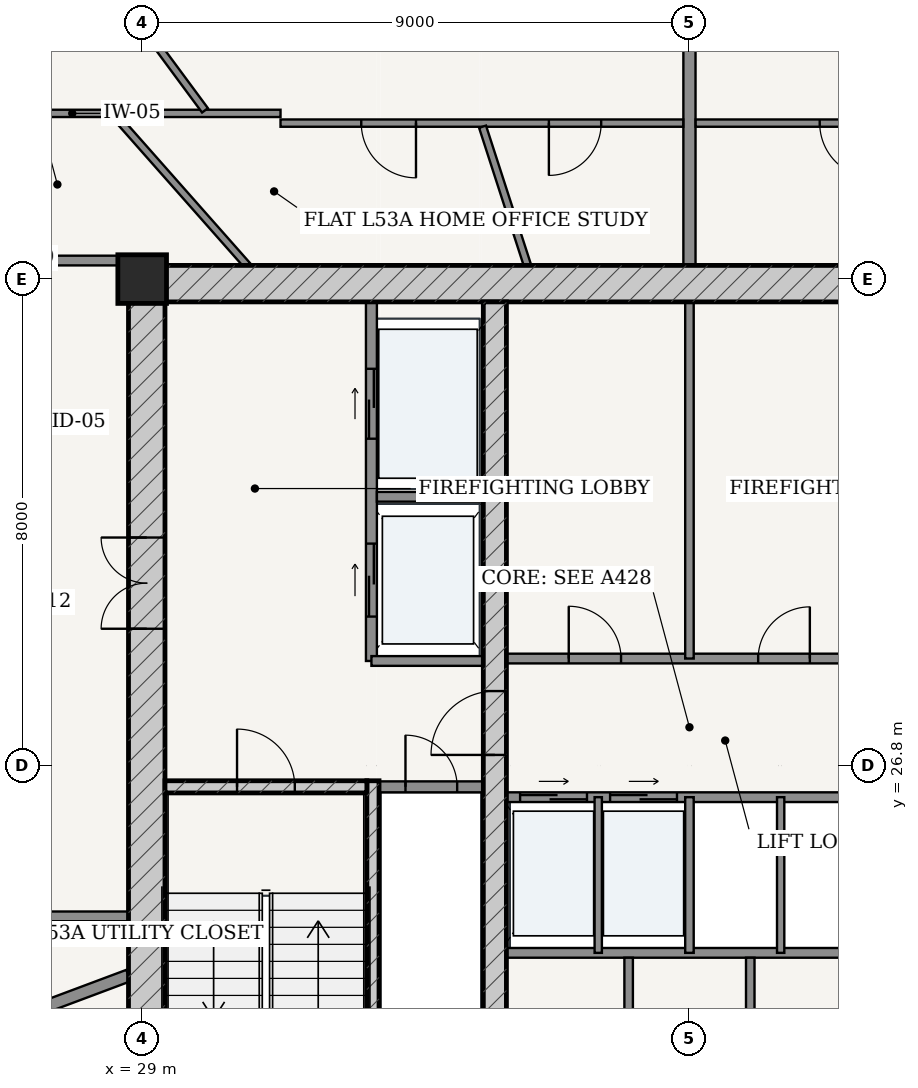
"""IFC4 building model, lengths in metres.
Left out: names, types, materials, properties, quantities, classifications, styles, units other than length and angle.
Written with IfcOpenShell. Run it as: python <this file> out.ifc"""

import sys

from ifc_helpers import new_model, si_unit, direction, frame, frame_2d, origin, origin_2d, place, context, subcontext, project, spatial, rectangle, extrude, source, transform, mapped, element, fill, save


model = new_model("IFC4")
c1 = context("Model", 3, precision=1e-05, world=origin(), true_north=direction((-0.2419218956, 0.970295726276)))
c2 = subcontext(c1, "Body", "Model", "MODEL_VIEW")
j1 = project(units=[si_unit("LENGTHUNIT", "METRE"), si_unit("PLANEANGLEUNIT", "RADIAN")], contexts=[c1])
p1 = place(None, origin())
s1 = spatial("IfcSite", under=j1, at=p1, CompositionType="ELEMENT")
p2 = place(p1, origin())
s2 = spatial("IfcBuilding", under=s1, at=p2, CompositionType="ELEMENT")
p3 = place(p2, frame((0.0, 0.0, 202.3)))
s3 = spatial("IfcBuildingStorey", under=s2, at=p3, CompositionType="ELEMENT", Elevation=202.3)
p4 = place(p3, frame((29.0, 34.8, 0.0), z_axis=(0.0, 0.0, 1.0), x_axis=(1.0, 0.0, 0.0)))
e1 = element("IfcColumn", 1, at=p4, inside=s3, PredefinedType="COLUMN", context=c2, shape_type="SweptSolid", body=[
    extrude(rectangle(XDim=0.8, YDim=0.8, at=origin_2d()), origin(), (0.0, 0.0, 1.0), 3.7),
])
p5 = place(p3, frame((28.775, 34.725, 0.0), z_axis=(0.0, 0.0, 1.0), x_axis=(1.0, 0.0, 0.0)))
e2 = element("IfcWall", 2, at=p5, inside=s3, PredefinedType="SHEAR", context=c2, shape_type="SweptSolid", body=[
    extrude(rectangle(XDim=18.45, YDim=0.6, at=frame_2d((9.225, 0.0))), origin(), (0.0, 0.0, 1.0), 3.435),
])
p6 = place(p3, frame((29.075, 19.175, 0.0), z_axis=(0.0, 0.0, 1.0), x_axis=(0.0, 1.0, 0.0)))
e3 = element("IfcWall", 3, at=p6, inside=s3, PredefinedType="SHEAR", context=c2, shape_type="SweptSolid", body=[
    extrude(rectangle(XDim=15.25, YDim=0.6, at=frame_2d((7.625, 0.0))), origin(), (0.0, 0.0, 1.0), 3.435),
])
p7 = place(p6, frame((9.875, 0.0, 0.0)))
e4 = element("IfcOpeningElement", 4, at=p7, cuts=e3, PredefinedType="OPENING", context=c2, shape_type="SweptSolid", body=[
    extrude(rectangle(XDim=1.5, YDim=2.2, at=frame_2d((0.75, 1.1))), frame((0.0, 0.31, 0.0), z_axis=(0.0, -1.0, 0.0), x_axis=(1.0, 0.0, 0.0)), (0.0, 0.0, 1.0), 0.62),
])
p8 = place(p3, frame((32.795, 19.175, 0.0), z_axis=(0.0, 0.0, 1.0), x_axis=(0.0, 1.0, 0.0)))
e5 = element("IfcWall", 5, at=p8, inside=s3, PredefinedType="SOLIDWALL", context=c2, shape_type="SweptSolid", body=[
    extrude(rectangle(XDim=7.375, YDim=0.2, at=frame_2d((3.688, 0.0))), origin(), (0.0, 0.0, 1.0), 3.435),
])
p9 = place(p3, frame((29.375, 26.45, 0.0), z_axis=(0.0, 0.0, 1.0), x_axis=(1.0, 0.0, 0.0)))
e6 = element("IfcWall", 6, at=p9, inside=s3, PredefinedType="SOLIDWALL", context=c2, shape_type="SweptSolid", body=[
    extrude(rectangle(XDim=3.32, YDim=0.2, at=frame_2d((1.66, 0.0))), origin(), (0.0, 0.0, 1.0), 3.435),
])
p10 = place(p9, frame((1.185, 0.0, 0.0)))
e7 = element("IfcOpeningElement", 7, at=p10, cuts=e6, PredefinedType="OPENING", context=c2, shape_type="SweptSolid", body=[
    extrude(rectangle(XDim=0.95, YDim=2.15, at=frame_2d((0.475, 1.075))), frame((0.0, 0.11, 0.0), z_axis=(0.0, -1.0, 0.0), x_axis=(1.0, 0.0, 0.0)), (0.0, 0.0, 1.0), 0.22),
])
p11 = place(p3, frame((34.8, 19.175, 0.0), z_axis=(0.0, 0.0, 1.0), x_axis=(0.0, 1.0, 0.0)))
e8 = element("IfcWall", 8, at=p11, inside=s3, PredefinedType="SHEAR", context=c2, shape_type="SweptSolid", body=[
    extrude(rectangle(XDim=15.25, YDim=0.38, at=frame_2d((7.625, 0.0))), origin(), (0.0, 0.0, 1.0), 3.435),
])
p12 = place(p11, frame((7.8, 0.0, 0.0)))
e9 = element("IfcOpeningElement", 9, at=p12, cuts=e8, PredefinedType="OPENING", context=c2, shape_type="SweptSolid", body=[
    extrude(rectangle(XDim=1.05, YDim=2.15, at=frame_2d((0.525, 1.075))), frame((0.0, 0.2, 0.0), z_axis=(0.0, -1.0, 0.0), x_axis=(1.0, 0.0, 0.0)), (0.0, 0.0, 1.0), 0.4),
])
p13 = place(p3, frame((32.9, 26.45, 0.0), z_axis=(0.0, 0.0, 1.0), x_axis=(1.0, 0.0, 0.0)))
e10 = element("IfcWall", 10, at=p13, inside=s3, PredefinedType="PARTITIONING", context=c2, shape_type="SweptSolid", body=[
    extrude(rectangle(XDim=1.71, YDim=0.18, at=frame_2d((0.855, 0.0))), origin(), (0.0, 0.0, 1.0), 3.435),
])
p14 = place(p13, frame((0.43, 0.0, 0.0)))
e11 = element("IfcOpeningElement", 11, at=p14, cuts=e10, PredefinedType="OPENING", context=c2, shape_type="SweptSolid", body=[
    extrude(rectangle(XDim=0.85, YDim=2.1, at=frame_2d((0.425, 1.05))), frame((0.0, 0.1, 0.0), z_axis=(0.0, -1.0, 0.0), x_axis=(1.0, 0.0, 0.0)), (0.0, 0.0, 1.0), 0.2),
])
p15 = place(p3, frame((32.77, 28.52, 0.0), z_axis=(0.0, 0.0, 1.0), x_axis=(0.0, 1.0, 0.0)))
e12 = element("IfcWall", 12, at=p15, inside=s3, PredefinedType="PARTITIONING", context=c2, shape_type="SweptSolid", body=[
    extrude(rectangle(XDim=5.905, YDim=0.18, at=frame_2d((2.953, 0.0))), origin(), (0.0, 0.0, 1.0), 3.435),
])
p16 = place(p15, frame((3.655, 0.0, 0.0)))
e13 = element("IfcOpeningElement", 13, at=p16, cuts=e12, PredefinedType="OPENING", context=c2, shape_type="SweptSolid", body=[
    extrude(rectangle(XDim=1.15, YDim=2.2, at=frame_2d((0.575, 1.1))), frame((0.0, 0.1, 0.0), z_axis=(0.0, -1.0, 0.0), x_axis=(1.0, 0.0, 0.0)), (0.0, 0.0, 1.0), 0.2),
])
p17 = place(p15, frame((0.73, 0.0, 0.0)))
e14 = element("IfcOpeningElement", 14, at=p17, cuts=e12, PredefinedType="OPENING", context=c2, shape_type="SweptSolid", body=[
    extrude(rectangle(XDim=1.2, YDim=2.25, at=frame_2d((0.6, 1.125))), frame((0.0, 0.1, 0.0), z_axis=(0.0, -1.0, 0.0), x_axis=(1.0, 0.0, 0.0)), (0.0, 0.0, 1.0), 0.2),
])
p18 = place(p3, frame((32.86, 31.22, 0.0), z_axis=(0.0, 0.0, 1.0), x_axis=(1.0, 0.0, 0.0)))
e15 = element("IfcWall", 15, at=p18, inside=s3, PredefinedType="PARTITIONING", context=c2, shape_type="SweptSolid", body=[
    extrude(rectangle(XDim=1.75, YDim=0.16, at=frame_2d((0.875, 0.0))), origin(), (0.0, 0.0, 1.0), 3.435),
])
p19 = place(p3, frame((32.77, 28.52, 0.0), z_axis=(0.0, 0.0, 1.0), x_axis=(1.0, 0.0, 0.0)))
e16 = element("IfcWall", 16, at=p19, inside=s3, PredefinedType="PARTITIONING", context=c2, shape_type="SweptSolid", body=[
    extrude(rectangle(XDim=1.84, YDim=0.16, at=frame_2d((0.92, 0.0))), origin(), (0.0, 0.0, 1.0), 3.435),
])
p20 = place(p3, frame((34.99, 28.56, 0.0), z_axis=(0.0, 0.0, 1.0), x_axis=(1.0, 0.0, 0.0)))
e17 = element("IfcWall", 17, at=p20, inside=s3, PredefinedType="PARTITIONING", context=c2, shape_type="SweptSolid", body=[
    extrude(rectangle(XDim=6.02, YDim=0.16, at=frame_2d((3.01, 0.0))), origin(), (0.0, 0.0, 1.0), 3.435),
])
p21 = place(p20, frame((1.025, 0.0, 0.0)))
e18 = element("IfcOpeningElement", 18, at=p21, cuts=e17, PredefinedType="OPENING", context=c2, shape_type="SweptSolid", body=[
    extrude(rectangle(XDim=0.86, YDim=2.1, at=frame_2d((0.43, 1.05))), frame((0.0, 0.09, 0.0), z_axis=(0.0, -1.0, 0.0), x_axis=(1.0, 0.0, 0.0)), (0.0, 0.0, 1.0), 0.18),
])
p22 = place(p20, frame((4.14, 0.0, 0.0)))
e19 = element("IfcOpeningElement", 19, at=p22, cuts=e17, PredefinedType="OPENING", context=c2, shape_type="SweptSolid", body=[
    extrude(rectangle(XDim=0.85, YDim=2.1, at=frame_2d((0.425, 1.05))), frame((0.0, 0.09, 0.0), z_axis=(0.0, -1.0, 0.0), x_axis=(1.0, 0.0, 0.0)), (0.0, 0.0, 1.0), 0.18),
])
p23 = place(p3, frame((38.0, 28.56, 0.0), z_axis=(0.0, 0.0, 1.0), x_axis=(0.0, 1.0, 0.0)))
e20 = element("IfcWall", 20, at=p23, inside=s3, PredefinedType="PARTITIONING", context=c2, shape_type="SweptSolid", body=[
    extrude(rectangle(XDim=5.865, YDim=0.14, at=frame_2d((2.933, 0.0))), origin(), (0.0, 0.0, 1.0), 3.435),
])
p24 = place(p3, frame((34.99, 26.28, 0.0), z_axis=(0.0, 0.0, 1.0), x_axis=(1.0, 0.0, 0.0)))
e21 = element("IfcWall", 21, at=p24, inside=s3, PredefinedType="PARTITIONING", context=c2, shape_type="SweptSolid", body=[
    extrude(rectangle(XDim=6.02, YDim=0.16, at=frame_2d((3.01, 0.0))), origin(), (0.0, 0.0, 1.0), 3.435),
])
p25 = place(p24, frame((0.225, 0.0, 0.0)))
e22 = element("IfcOpeningElement", 22, at=p25, cuts=e21, PredefinedType="OPENING", context=c2, shape_type="SweptSolid", body=[
    extrude(rectangle(XDim=1.1, YDim=2.2, at=frame_2d((0.55, 1.1))), frame((0.0, 0.09, 0.0), z_axis=(0.0, -1.0, 0.0), x_axis=(1.0, 0.0, 0.0)), (0.0, 0.0, 1.0), 0.18),
])
p26 = place(p24, frame((1.705, 0.0, 0.0)))
e23 = element("IfcOpeningElement", 23, at=p26, cuts=e21, PredefinedType="OPENING", context=c2, shape_type="SweptSolid", body=[
    extrude(rectangle(XDim=1.1, YDim=2.2, at=frame_2d((0.55, 1.1))), frame((0.0, 0.09, 0.0), z_axis=(0.0, -1.0, 0.0), x_axis=(1.0, 0.0, 0.0)), (0.0, 0.0, 1.0), 0.18),
])
p27 = place(p3, frame((34.99, 23.72, 0.0), z_axis=(0.0, 0.0, 1.0), x_axis=(1.0, 0.0, 0.0)))
e24 = element("IfcWall", 24, at=p27, inside=s3, PredefinedType="PARTITIONING", context=c2, shape_type="SweptSolid", body=[
    extrude(rectangle(XDim=6.02, YDim=0.16, at=frame_2d((3.01, 0.0))), origin(), (0.0, 0.0, 1.0), 3.435),
])
p28 = place(p3, frame((36.5, 23.72, 0.0), z_axis=(0.0, 0.0, 1.0), x_axis=(0.0, 1.0, 0.0)))
e25 = element("IfcWall", 25, at=p28, inside=s3, PredefinedType="PARTITIONING", context=c2, shape_type="SweptSolid", body=[
    extrude(rectangle(XDim=2.56, YDim=0.12, at=frame_2d((1.28, 0.0))), origin(), (0.0, 0.0, 1.0), 3.435),
])
p29 = place(p3, frame((38.0, 23.72, 0.0), z_axis=(0.0, 0.0, 1.0), x_axis=(0.0, 1.0, 0.0)))
e26 = element("IfcWall", 26, at=p29, inside=s3, PredefinedType="PARTITIONING", context=c2, shape_type="SweptSolid", body=[
    extrude(rectangle(XDim=2.56, YDim=0.14, at=frame_2d((1.28, 0.0))), origin(), (0.0, 0.0, 1.0), 3.435),
])
p30 = place(p3, frame((39.5, 23.72, 0.0), z_axis=(0.0, 0.0, 1.0), x_axis=(0.0, 1.0, 0.0)))
e27 = element("IfcWall", 27, at=p30, inside=s3, PredefinedType="PARTITIONING", context=c2, shape_type="SweptSolid", body=[
    extrude(rectangle(XDim=2.56, YDim=0.12, at=frame_2d((1.28, 0.0))), origin(), (0.0, 0.0, 1.0), 3.435),
])
p31 = place(p3, frame((37.0, 19.175, 0.0), z_axis=(0.0, 0.0, 1.0), x_axis=(0.0, 1.0, 0.0)))
e28 = element("IfcWall", 28, at=p31, inside=s3, PredefinedType="PARTITIONING", context=c2, shape_type="SweptSolid", body=[
    extrude(rectangle(XDim=4.465, YDim=0.14, at=frame_2d((2.232, 0.0))), origin(), (0.0, 0.0, 1.0), 3.435),
])
p32 = place(p31, frame((1.808, 0.0, 0.0)))
e29 = element("IfcOpeningElement", 29, at=p32, cuts=e28, PredefinedType="OPENING", context=c2, shape_type="SweptSolid", body=[
    extrude(rectangle(XDim=0.85, YDim=2.1, at=frame_2d((0.425, 1.05))), frame((0.0, 0.08, 0.0), z_axis=(0.0, -1.0, 0.0), x_axis=(1.0, 0.0, 0.0)), (0.0, 0.0, 1.0), 0.16),
])
p33 = place(p3, frame((39.0, 19.175, 0.0), z_axis=(0.0, 0.0, 1.0), x_axis=(0.0, 1.0, 0.0)))
e30 = element("IfcWall", 30, at=p33, inside=s3, PredefinedType="PARTITIONING", context=c2, shape_type="SweptSolid", body=[
    extrude(rectangle(XDim=4.465, YDim=0.14, at=frame_2d((2.232, 0.0))), origin(), (0.0, 0.0, 1.0), 3.435),
])
p34 = place(p33, frame((1.808, 0.0, 0.0)))
e31 = element("IfcOpeningElement", 31, at=p34, cuts=e30, PredefinedType="OPENING", context=c2, shape_type="SweptSolid", body=[
    extrude(rectangle(XDim=0.85, YDim=2.1, at=frame_2d((0.425, 1.05))), frame((0.0, 0.08, 0.0), z_axis=(0.0, -1.0, 0.0), x_axis=(1.0, 0.0, 0.0)), (0.0, 0.0, 1.0), 0.16),
])
for number, where, z_axis, x_axis in (
    (32, (26.845, 35.105, 0.0), (0.0, 0.0, 1.0), (1.0, 0.0, 0.0)),
    (33, (26.845, 24.32, 0.0), (0.0, 0.0, 1.0), (1.0, 0.0, 0.0)),
):
    element("IfcWall", number, at=place(p3, frame(where, z_axis=z_axis, x_axis=x_axis)), inside=s3, PredefinedType="PARTITIONING", context=c2, shape_type="SweptSolid", body=[
        extrude(rectangle(XDim=1.93, YDim=0.16, at=frame_2d((0.965, 0.0))), origin(), (0.0, 0.0, 1.0), 3.435),
    ])
p35 = place(p3, frame((38.0, 35.027, 0.0), z_axis=(0.0, 0.0, 1.0), x_axis=(0.0, 1.0, 0.0)))
e34 = element("IfcWall", 34, at=p35, inside=s3, PredefinedType="PARTITIONING", context=c2, shape_type="SweptSolid", body=[
    extrude(rectangle(XDim=11.413, YDim=0.2, at=frame_2d((5.707, 0.0))), origin(), (0.0, 0.0, 1.0), 2.52),
])
p36 = place(p3, frame((24.425, 37.525, 0.0), z_axis=(0.0, 0.0, 1.0), x_axis=(1.0, 0.0, 0.0)))
e35 = element("IfcWall", 35, at=p36, inside=s3, PredefinedType="PARTITIONING", context=c2, shape_type="SweptSolid", body=[
    extrude(rectangle(XDim=6.85, YDim=0.12, at=frame_2d((3.425, 0.0))), origin(), (0.0, 0.0, 1.0), 2.951),
])
p37 = place(p3, frame((31.275, 37.365, 0.0), z_axis=(0.0, 0.0, 1.0), x_axis=(1.0, 0.0, 0.0)))
e36 = element("IfcWall", 36, at=p37, inside=s3, PredefinedType="PARTITIONING", context=c2, shape_type="SweptSolid", body=[
    extrude(rectangle(XDim=6.623, YDim=0.12, at=frame_2d((3.312, 0.0))), origin(), (0.0, 0.0, 1.0), 2.951),
])
p38 = place(p37, frame((4.413, 0.0, 0.0)))
e37 = element("IfcOpeningElement", 37, at=p38, cuts=e36, PredefinedType="OPENING", context=c2, shape_type="SweptSolid", body=[
    extrude(rectangle(XDim=0.86, YDim=2.15, at=frame_2d((0.43, 1.075))), frame((0.0, 0.07, 0.0), z_axis=(0.0, -1.0, 0.0), x_axis=(1.0, 0.0, 0.0)), (0.0, 0.0, 1.0), 0.14),
])
p39 = place(p37, frame((1.328, 0.0, 0.0)))
e38 = element("IfcOpeningElement", 38, at=p39, cuts=e36, PredefinedType="OPENING", context=c2, shape_type="SweptSolid", body=[
    extrude(rectangle(XDim=0.9, YDim=2.15, at=frame_2d((0.45, 1.075))), frame((0.0, 0.07, 0.0), z_axis=(0.0, -1.0, 0.0), x_axis=(1.0, 0.0, 0.0)), (0.0, 0.0, 1.0), 0.14),
])
p40 = place(p3, frame((30.033, 37.575, 0.0), z_axis=(0.0, 0.0, 1.0), x_axis=(-0.59452500855, 0.804077119565, 0.0)))
e39 = element("IfcWall", 39, at=p40, inside=s3, PredefinedType="PARTITIONING", context=c2, shape_type="SweptSolid", body=[
    extrude(rectangle(XDim=6.867, YDim=0.12, at=frame_2d((3.434, 0.0))), origin(), (0.0, 0.0, 1.0), 2.951),
])
p41 = place(p40, frame((1.976, 0.0, 0.0)))
e40 = element("IfcOpeningElement", 40, at=p41, cuts=e39, PredefinedType="OPENING", context=c2, shape_type="SweptSolid", body=[
    extrude(rectangle(XDim=0.9, YDim=2.15, at=frame_2d((0.45, 1.075))), frame((0.0, 0.07, 0.0), z_axis=(0.0, -1.0, 0.0), x_axis=(1.0, 0.0, 0.0)), (0.0, 0.0, 1.0), 0.14),
])
p42 = place(p3, frame((35.336, 35.027, 0.0), z_axis=(0.0, 0.0, 1.0), x_axis=(-0.308083476138, 0.951359328398, 0.0)))
e41 = element("IfcWall", 41, at=p42, inside=s3, PredefinedType="PARTITIONING", context=c2, shape_type="SweptSolid", body=[
    extrude(rectangle(XDim=2.396, YDim=0.12, at=frame_2d((1.198, 0.0))), origin(), (0.0, 0.0, 1.0), 2.52),
])
p43 = place(p3, frame((30.726, 35.027, 0.0), z_axis=(0.0, 0.0, 1.0), x_axis=(-0.662398427862, 0.749151735475, 0.0)))
e42 = element("IfcWall", 42, at=p43, inside=s3, PredefinedType="PARTITIONING", context=c2, shape_type="SweptSolid", body=[
    extrude(rectangle(XDim=3.273, YDim=0.12, at=frame_2d((1.636, 0.0))), origin(), (0.0, 0.0, 1.0), 3.435),
])
p44 = place(p3, frame((28.775, 23.347, 0.0), z_axis=(0.0, 0.0, 1.0), x_axis=(-0.936537569358, -0.350567227761, 0.0)))
e43 = element("IfcWall", 43, at=p44, inside=s3, PredefinedType="PARTITIONING", context=c2, shape_type="SweptSolid", body=[
    extrude(rectangle(XDim=11.594, YDim=0.2, at=frame_2d((5.797, 0.0))), origin(), (0.0, 0.0, 1.0), 2.951),
])
p45 = place(p3, frame((38.102, 37.365, 0.0), z_axis=(0.0, 0.0, 1.0), x_axis=(1.0, 0.0, 0.0)))
e44 = element("IfcWall", 44, at=p45, inside=s3, PredefinedType="PARTITIONING", context=c2, shape_type="SweptSolid", body=[
    extrude(rectangle(XDim=6.623, YDim=0.12, at=frame_2d((3.312, 0.0))), origin(), (0.0, 0.0, 1.0), 2.951),
])
p46 = place(p45, frame((5.06, 0.0, 0.0)))
e45 = element("IfcOpeningElement", 45, at=p46, cuts=e44, PredefinedType="OPENING", context=c2, shape_type="SweptSolid", body=[
    extrude(rectangle(XDim=0.9, YDim=2.15, at=frame_2d((0.45, 1.075))), frame((0.0, 0.07, 0.0), z_axis=(0.0, -1.0, 0.0), x_axis=(1.0, 0.0, 0.0)), (0.0, 0.0, 1.0), 0.14),
])
p47 = place(p45, frame((2.04, 0.0, 0.0)))
e46 = element("IfcOpeningElement", 46, at=p47, cuts=e44, PredefinedType="OPENING", context=c2, shape_type="SweptSolid", body=[
    extrude(rectangle(XDim=0.9, YDim=2.15, at=frame_2d((0.45, 1.075))), frame((0.0, 0.07, 0.0), z_axis=(0.0, -1.0, 0.0), x_axis=(1.0, 0.0, 0.0)), (0.0, 0.0, 1.0), 0.14),
])
m1 = source(origin(), c2, "Body", "SweptSolid", [
    extrude(rectangle(XDim=1.5, YDim=2.2, at=frame_2d((0.75, 1.1))), frame((0.0, 0.025, 0.0), z_axis=(0.0, -1.0, 0.0), x_axis=(1.0, 0.0, 0.0)), (0.0, 0.0, 1.0), 0.05),
])
p48 = place(p7, origin())
e47 = element("IfcDoor", 47, at=p48, inside=s3, OperationType="DOUBLE_DOOR_SINGLE_SWING", PredefinedType="DOOR", context=c2, shape_type="MappedRepresentation", body=[
    mapped(m1, transform((0.0, 0.0, 0.0), scale=1.0)),
])
fill(e4, e47)
m2 = source(origin(), c2, "Body", "SweptSolid", [
    extrude(rectangle(XDim=1.05, YDim=2.15, at=frame_2d((0.525, 1.075))), frame((0.0, 0.025, 0.0), z_axis=(0.0, -1.0, 0.0), x_axis=(1.0, 0.0, 0.0)), (0.0, 0.0, 1.0), 0.05),
])
p49 = place(p12, origin())
e48 = element("IfcDoor", 48, at=p49, inside=s3, OperationType="SINGLE_SWING_LEFT", PredefinedType="DOOR", context=c2, shape_type="MappedRepresentation", body=[
    mapped(m2, transform((0.0, 0.0, 0.0), scale=1.0)),
])
fill(e9, e48)
m3 = source(origin(), c2, "Body", "SweptSolid", [
    extrude(rectangle(XDim=0.95, YDim=2.15, at=frame_2d((0.475, 1.075))), frame((0.0, 0.025, 0.0), z_axis=(0.0, -1.0, 0.0), x_axis=(1.0, 0.0, 0.0)), (0.0, 0.0, 1.0), 0.05),
])
p50 = place(p10, origin())
e49 = element("IfcDoor", 49, at=p50, inside=s3, OperationType="SINGLE_SWING_LEFT", PredefinedType="DOOR", context=c2, shape_type="MappedRepresentation", body=[
    mapped(m3, transform((0.0, 0.0, 0.0), scale=1.0)),
])
fill(e7, e49)
m4 = source(origin(), c2, "Body", "SweptSolid", [
    extrude(rectangle(XDim=0.85, YDim=2.1, at=frame_2d((0.425, 1.05))), frame((0.0, 0.025, 0.0), z_axis=(0.0, -1.0, 0.0), x_axis=(1.0, 0.0, 0.0)), (0.0, 0.0, 1.0), 0.05),
])
p51 = place(p14, origin())
e50 = element("IfcDoor", 50, at=p51, inside=s3, OperationType="SINGLE_SWING_LEFT", PredefinedType="DOOR", context=c2, shape_type="MappedRepresentation", body=[
    mapped(m4, transform((0.0, 0.0, 0.0), scale=1.0)),
])
fill(e11, e50)
m5 = source(origin(), c2, "Body", "SweptSolid", [
    extrude(rectangle(XDim=0.86, YDim=2.1, at=frame_2d((0.43, 1.05))), frame((0.0, 0.025, 0.0), z_axis=(0.0, -1.0, 0.0), x_axis=(1.0, 0.0, 0.0)), (0.0, 0.0, 1.0), 0.05),
])
p52 = place(p21, origin())
e51 = element("IfcDoor", 51, at=p52, inside=s3, OperationType="SINGLE_SWING_LEFT", PredefinedType="DOOR", context=c2, shape_type="MappedRepresentation", body=[
    mapped(m5, transform((0.0, 0.0, 0.0), scale=1.0)),
])
fill(e18, e51)
p53 = place(p22, origin())
e52 = element("IfcDoor", 52, at=p53, inside=s3, OperationType="SINGLE_SWING_RIGHT", PredefinedType="DOOR", context=c2, shape_type="MappedRepresentation", body=[
    mapped(m4, transform((0.0, 0.0, 0.0), scale=1.0)),
])
fill(e19, e52)
m6 = source(origin(), c2, "Body", "SweptSolid", [
    extrude(rectangle(XDim=1.15, YDim=2.2, at=frame_2d((0.575, 1.1))), frame((0.0, 0.025, 0.0), z_axis=(0.0, -1.0, 0.0), x_axis=(1.0, 0.0, 0.0)), (0.0, 0.0, 1.0), 0.05),
])
p54 = place(p16, origin())
e53 = element("IfcDoor", 53, at=p54, inside=s3, OperationType="DOUBLE_DOOR_SLIDING", PredefinedType="DOOR", context=c2, shape_type="MappedRepresentation", body=[
    mapped(m6, transform((0.0, 0.0, 0.0), scale=1.0)),
])
fill(e13, e53)
m7 = source(origin(), c2, "Body", "SweptSolid", [
    extrude(rectangle(XDim=1.2, YDim=2.25, at=frame_2d((0.6, 1.125))), frame((0.0, 0.025, 0.0), z_axis=(0.0, -1.0, 0.0), x_axis=(1.0, 0.0, 0.0)), (0.0, 0.0, 1.0), 0.05),
])
p55 = place(p17, origin())
e54 = element("IfcDoor", 54, at=p55, inside=s3, OperationType="DOUBLE_DOOR_SLIDING", PredefinedType="DOOR", context=c2, shape_type="MappedRepresentation", body=[
    mapped(m7, transform((0.0, 0.0, 0.0), scale=1.0)),
])
fill(e14, e54)
m8 = source(origin(), c2, "Body", "SweptSolid", [
    extrude(rectangle(XDim=1.1, YDim=2.2, at=frame_2d((0.55, 1.1))), frame((0.0, 0.025, 0.0), z_axis=(0.0, -1.0, 0.0), x_axis=(1.0, 0.0, 0.0)), (0.0, 0.0, 1.0), 0.05),
])
p56 = place(p25, origin())
e55 = element("IfcDoor", 55, at=p56, inside=s3, OperationType="DOUBLE_DOOR_SLIDING", PredefinedType="DOOR", context=c2, shape_type="MappedRepresentation", body=[
    mapped(m8, transform((0.0, 0.0, 0.0), scale=1.0)),
])
fill(e22, e55)
p57 = place(p26, origin())
e56 = element("IfcDoor", 56, at=p57, inside=s3, OperationType="DOUBLE_DOOR_SLIDING", PredefinedType="DOOR", context=c2, shape_type="MappedRepresentation", body=[
    mapped(m8, transform((0.0, 0.0, 0.0), scale=1.0)),
])
fill(e23, e56)
m9 = source(origin(), c2, "Body", "SweptSolid", [
    extrude(rectangle(XDim=0.86, YDim=2.15, at=frame_2d((0.43, 1.075))), frame((0.0, 0.025, 0.0), z_axis=(0.0, -1.0, 0.0), x_axis=(1.0, 0.0, 0.0)), (0.0, 0.0, 1.0), 0.05),
])
p58 = place(p38, frame((0.86, 0.0, 0.0), z_axis=(0.0, 0.0, 1.0), x_axis=(-1.0, 0.0, 0.0)))
e57 = element("IfcDoor", 57, at=p58, inside=s3, OperationType="SINGLE_SWING_RIGHT", PredefinedType="DOOR", context=c2, shape_type="MappedRepresentation", body=[
    mapped(m9, transform((0.0, 0.0, 0.0), scale=1.0)),
])
fill(e37, e57)
m10 = source(origin(), c2, "Body", "SweptSolid", [
    extrude(rectangle(XDim=0.9, YDim=2.15, at=frame_2d((0.45, 1.075))), frame((0.0, 0.025, 0.0), z_axis=(0.0, -1.0, 0.0), x_axis=(1.0, 0.0, 0.0)), (0.0, 0.0, 1.0), 0.05),
])
p59 = place(p39, frame((0.9, 0.0, 0.0), z_axis=(0.0, 0.0, 1.0), x_axis=(-1.0, 0.0, 0.0)))
e58 = element("IfcDoor", 58, at=p59, inside=s3, OperationType="SINGLE_SWING_LEFT", PredefinedType="DOOR", context=c2, shape_type="MappedRepresentation", body=[
    mapped(m10, transform((0.0, 0.0, 0.0), scale=1.0)),
])
fill(e38, e58)
p60 = place(p47, frame((0.9, 0.0, 0.0), z_axis=(0.0, 0.0, 1.0), x_axis=(-1.0, 0.0, 0.0)))
e59 = element("IfcDoor", 59, at=p60, inside=s3, OperationType="SINGLE_SWING_LEFT", PredefinedType="DOOR", context=c2, shape_type="MappedRepresentation", body=[
    mapped(m10, transform((0.0, 0.0, 0.0), scale=1.0)),
])
fill(e46, e59)
save(model, sys.argv[1])
